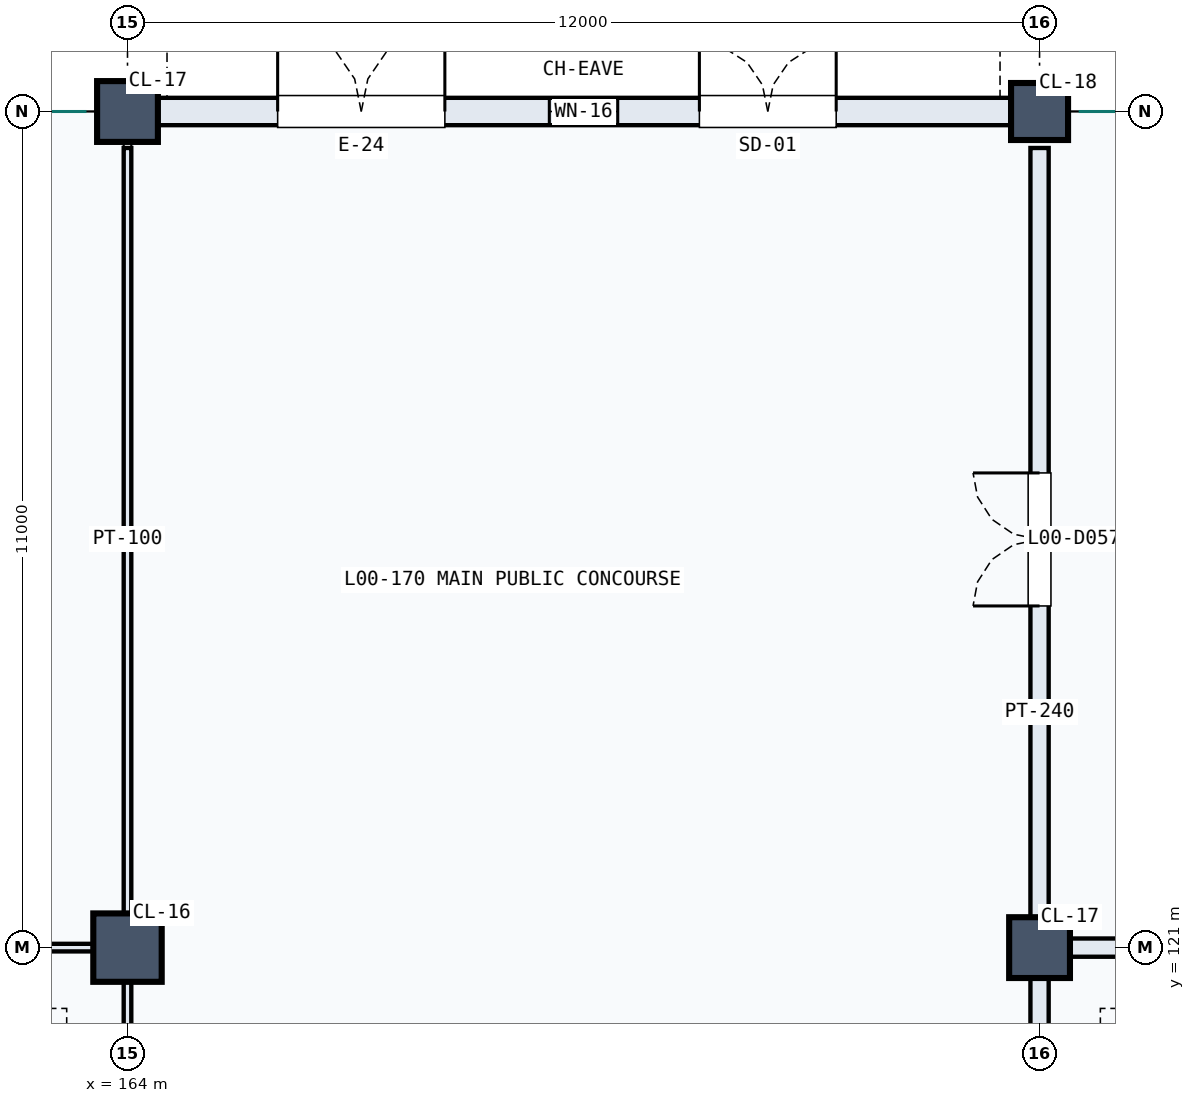
"""IFC4 building model, lengths in metres.
Left out: names, types, materials, properties, quantities, classifications, styles, units other than length and angle.
Written with IfcOpenShell. Run it as: python <this file> out.ifc"""

import sys

from ifc_helpers import new_model, si_unit, direction, frame, frame_2d, origin, origin_2d, place, context, subcontext, project, spatial, rectangle, circle, extrude, element, fill, save


model = new_model("IFC4")
c1 = context("Model", 3, precision=1e-05, world=origin(), true_north=direction((0.0, 1.0)))
c2 = subcontext(c1, "Body", "Model", "MODEL_VIEW")
j1 = project(units=[si_unit("LENGTHUNIT", "METRE"), si_unit("PLANEANGLEUNIT", "RADIAN")], contexts=[c1])
p1 = place(None, origin())
s1 = spatial("IfcSite", under=j1, at=p1, CompositionType="ELEMENT")
p2 = place(p1, origin())
s2 = spatial("IfcBuilding", under=s1, at=p2, CompositionType="ELEMENT")
p3 = place(p2, origin())
s3 = spatial("IfcBuildingStorey", under=s2, at=p3, CompositionType="ELEMENT", Elevation=0.0)
p4 = place(p3, frame((164.0, 121.0, 0.0), z_axis=(0.0, 0.0, 1.0), x_axis=(1.0, 0.0, 0.0)))
e1 = element("IfcColumn", 1, at=p4, inside=s3, PredefinedType="COLUMN", context=c2, shape_type="SweptSolid", body=[
    extrude(circle(Radius=0.45, at=origin_2d()), origin(), (0.0, 0.0, 1.0), 5.4),
])
for number, where, z_axis, x_axis in (
    (2, (164.0, 132.0, 0.0), (0.0, 0.0, 1.0), (1.0, 0.0, 0.0)),
    (3, (176.0, 121.0, 0.0), (0.0, 0.0, 1.0), (1.0, 0.0, 0.0)),
):
    element("IfcColumn", number, at=place(p3, frame(where, z_axis=z_axis, x_axis=x_axis)), inside=s3, PredefinedType="COLUMN", context=c2, shape_type="SweptSolid", body=[
        extrude(circle(Radius=0.4, at=origin_2d()), origin(), (0.0, 0.0, 1.0), 5.4),
    ])
p5 = place(p3, frame((176.0, 132.0, 0.0), z_axis=(0.0, 0.0, 1.0), x_axis=(1.0, 0.0, 0.0)))
e4 = element("IfcColumn", 4, at=p5, inside=s3, PredefinedType="COLUMN", context=c2, shape_type="SweptSolid", body=[
    extrude(circle(Radius=0.375, at=origin_2d()), origin(), (0.0, 0.0, 1.0), 5.4),
])
p6 = place(p3, frame((164.22, 132.0, 0.0), z_axis=(0.0, 0.0, 1.0), x_axis=(1.0, 0.0, 0.0)))
e5 = element("IfcWall", 5, at=p6, inside=s3, PredefinedType="SOLIDWALL", context=c2, shape_type="SweptSolid", body=[
    extrude(rectangle(XDim=11.56, YDim=0.36, at=frame_2d((5.78, 0.0))), origin(), (0.0, 0.0, 1.0), 5.065),
])
p7 = place(p6, frame((1.756, 0.0, 0.0)))
e6 = element("IfcOpeningElement", 6, at=p7, cuts=e5, PredefinedType="OPENING", context=c2, shape_type="SweptSolid", body=[
    extrude(rectangle(XDim=2.2, YDim=2.35, at=frame_2d((1.1, 1.175))), frame((0.0, 0.19, 0.0), z_axis=(0.0, -1.0, 0.0), x_axis=(1.0, 0.0, 0.0)), (0.0, 0.0, 1.0), 0.38),
])
p8 = place(p6, frame((7.304, 0.0, 0.0)))
e7 = element("IfcOpeningElement", 7, at=p8, cuts=e5, PredefinedType="OPENING", context=c2, shape_type="SweptSolid", body=[
    extrude(rectangle(XDim=1.8, YDim=2.3, at=frame_2d((0.9, 1.15))), frame((0.0, 0.19, 0.0), z_axis=(0.0, -1.0, 0.0), x_axis=(1.0, 0.0, 0.0)), (0.0, 0.0, 1.0), 0.38),
])
p9 = place(p6, frame((5.33, 0.0, 0.8)))
e8 = element("IfcOpeningElement", 8, at=p9, cuts=e5, PredefinedType="OPENING", context=c2, shape_type="SweptSolid", body=[
    extrude(rectangle(XDim=0.9, YDim=1.8, at=frame_2d((0.45, 0.9))), frame((0.0, 0.19, 0.0), z_axis=(0.0, -1.0, 0.0), x_axis=(1.0, 0.0, 0.0)), (0.0, 0.0, 1.0), 0.38),
])
p10 = place(p3, frame((164.0, 110.22, 0.0), z_axis=(0.0, 0.0, 1.0), x_axis=(0.0, 1.0, 0.0)))
e9 = element("IfcWall", 9, at=p10, inside=s3, PredefinedType="PARTITIONING", context=c2, shape_type="SweptSolid", body=[
    extrude(rectangle(XDim=10.56, YDim=0.1, at=frame_2d((5.28, 0.0))), origin(), (0.0, 0.0, 1.0), 4.35),
])
p11 = place(p3, frame((164.0, 121.22, 0.0), z_axis=(0.0, 0.0, 1.0), x_axis=(0.0, 1.0, 0.0)))
e10 = element("IfcWall", 10, at=p11, inside=s3, PredefinedType="PARTITIONING", context=c2, shape_type="SweptSolid", body=[
    extrude(rectangle(XDim=10.3, YDim=0.1, at=frame_2d((5.15, 0.0))), origin(), (0.0, 0.0, 1.0), 4.45),
])
p12 = place(p3, frame((176.0, 110.22, 0.0), z_axis=(0.0, 0.0, 1.0), x_axis=(0.0, 1.0, 0.0)))
e11 = element("IfcWall", 11, at=p12, inside=s3, PredefinedType="PARTITIONING", context=c2, shape_type="SweptSolid", body=[
    extrude(rectangle(XDim=10.56, YDim=0.24, at=frame_2d((5.28, 0.0))), origin(), (0.0, 0.0, 1.0), 4.15),
])
p13 = place(p12, frame((4.57, 0.0, 0.0)))
e12 = element("IfcOpeningElement", 12, at=p13, cuts=e11, PredefinedType="OPENING", context=c2, shape_type="SweptSolid", body=[
    extrude(rectangle(XDim=1.42, YDim=2.25, at=frame_2d((0.71, 1.125))), frame((0.0, 0.13, 0.0), z_axis=(0.0, -1.0, 0.0), x_axis=(1.0, 0.0, 0.0)), (0.0, 0.0, 1.0), 0.26),
])
p14 = place(p3, frame((176.0, 121.22, 0.0), z_axis=(0.0, 0.0, 1.0), x_axis=(0.0, 1.0, 0.0)))
e13 = element("IfcWall", 13, at=p14, inside=s3, PredefinedType="PARTITIONING", context=c2, shape_type="SweptSolid", body=[
    extrude(rectangle(XDim=10.3, YDim=0.24, at=frame_2d((5.15, 0.0))), origin(), (0.0, 0.0, 1.0), 4.438),
])
p15 = place(p14, frame((4.275, 0.0, 0.0)))
e14 = element("IfcOpeningElement", 14, at=p15, cuts=e13, PredefinedType="OPENING", context=c2, shape_type="SweptSolid", body=[
    extrude(rectangle(XDim=1.75, YDim=2.25, at=frame_2d((0.875, 1.125))), frame((0.0, 0.13, 0.0), z_axis=(0.0, -1.0, 0.0), x_axis=(1.0, 0.0, 0.0)), (0.0, 0.0, 1.0), 0.26),
])
p16 = place(p3, frame((152.22, 121.0, 0.0), z_axis=(0.0, 0.0, 1.0), x_axis=(1.0, 0.0, 0.0)))
e15 = element("IfcWall", 15, at=p16, inside=s3, PredefinedType="PARTITIONING", context=c2, shape_type="SweptSolid", body=[
    extrude(rectangle(XDim=11.56, YDim=0.1, at=frame_2d((5.78, 0.0))), origin(), (0.0, 0.0, 1.0), 4.25),
])
p17 = place(p3, frame((176.22, 121.0, 0.0), z_axis=(0.0, 0.0, 1.0), x_axis=(1.0, 0.0, 0.0)))
e16 = element("IfcWall", 16, at=p17, inside=s3, PredefinedType="PARTITIONING", context=c2, shape_type="SweptSolid", body=[
    extrude(rectangle(XDim=10.3, YDim=0.24, at=frame_2d((5.15, 0.0))), origin(), (0.0, 0.0, 1.0), 4.438),
])
p18 = place(p7, origin())
e17 = element("IfcDoor", 17, at=p18, inside=s3, OperationType="DOUBLE_DOOR_SINGLE_SWING", PredefinedType="DOOR", context=c2, shape_type="SweptSolid", body=[
    extrude(rectangle(XDim=2.2, YDim=2.35, at=frame_2d((1.1, 1.175))), frame((0.0, 0.025, 0.0), z_axis=(0.0, -1.0, 0.0), x_axis=(1.0, 0.0, 0.0)), (0.0, 0.0, 1.0), 0.05),
])
fill(e6, e17)
p19 = place(p8, origin())
e18 = element("IfcDoor", 18, at=p19, inside=s3, OperationType="DOUBLE_DOOR_SINGLE_SWING", PredefinedType="DOOR", context=c2, shape_type="SweptSolid", body=[
    extrude(rectangle(XDim=1.8, YDim=2.3, at=frame_2d((0.9, 1.15))), frame((0.0, 0.025, 0.0), z_axis=(0.0, -1.0, 0.0), x_axis=(1.0, 0.0, 0.0)), (0.0, 0.0, 1.0), 0.05),
])
fill(e7, e18)
p20 = place(p9, origin())
e19 = element("IfcWindow", 19, at=p20, inside=s3, PartitioningType="SINGLE_PANEL", PredefinedType="WINDOW", context=c2, shape_type="SweptSolid", body=[
    extrude(rectangle(XDim=0.9, YDim=1.8, at=frame_2d((0.45, 0.9))), frame((0.0, 0.03, 0.0), z_axis=(0.0, -1.0, 0.0), x_axis=(1.0, 0.0, 0.0)), (0.0, 0.0, 1.0), 0.06),
])
fill(e8, e19)
p21 = place(p15, origin())
e20 = element("IfcDoor", 20, at=p21, inside=s3, OperationType="DOUBLE_DOOR_SINGLE_SWING", PredefinedType="DOOR", context=c2, shape_type="SweptSolid", body=[
    extrude(rectangle(XDim=1.75, YDim=2.25, at=frame_2d((0.875, 1.125))), frame((0.0, 0.025, 0.0), z_axis=(0.0, -1.0, 0.0), x_axis=(1.0, 0.0, 0.0)), (0.0, 0.0, 1.0), 0.05),
])
fill(e14, e20)
save(model, sys.argv[1])
